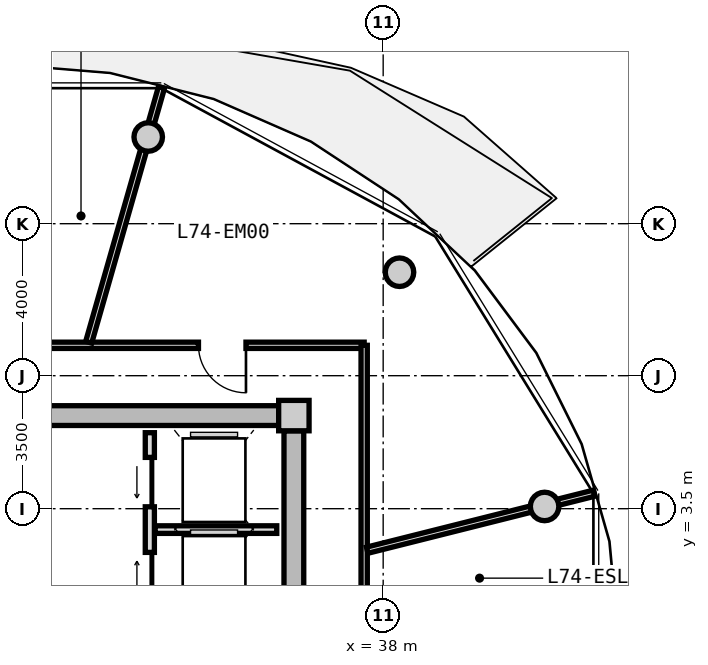
"""IFC4 building model, lengths in metres.
Left out: names, types, materials, properties, quantities, classifications, styles, units other than length and angle.
Written with IfcOpenShell. Run it as: python <this file> out.ifc"""

import sys

from ifc_helpers import new_model, si_unit, direction, frame, frame_2d, origin, origin_2d, place, context, subcontext, project, spatial, rectangle, circle, extrude, source, transform, mapped, element, fill, save


model = new_model("IFC4")
c1 = context("Model", 3, precision=1e-05, world=origin(), true_north=direction((0.0, 1.0)))
c2 = subcontext(c1, "Body", "Model", "MODEL_VIEW")
j1 = project(units=[si_unit("LENGTHUNIT", "METRE"), si_unit("PLANEANGLEUNIT", "RADIAN")], contexts=[c1])
p1 = place(None, origin())
s1 = spatial("IfcSite", under=j1, at=p1, CompositionType="ELEMENT")
p2 = place(p1, origin())
s2 = spatial("IfcBuilding", under=s1, at=p2, CompositionType="ELEMENT")
p3 = place(p2, frame((0.0, 0.0, 238.3)))
s3 = spatial("IfcBuildingStorey", under=s2, at=p3, CompositionType="ELEMENT", Elevation=238.3)
m1 = source(origin(), c2, "Body", "SweptSolid", [
    extrude(rectangle(XDim=0.8, YDim=0.8, at=origin_2d()), origin(), (0.0, 0.0, 1.0), 3.05),
])
p4 = place(p3, frame((35.65, 5.95, 0.0), z_axis=(0.0, 0.0, 1.0), x_axis=(1.0, 0.0, 0.0)))
e1 = element("IfcColumn", 1, at=p4, inside=s3, PredefinedType="COLUMN", context=c2, shape_type="MappedRepresentation", body=[
    mapped(m1, transform((0.0, 0.0, 0.0), x_axis=(1.0, 0.0, 0.0), y_axis=(0.0, 1.0, 0.0), z_axis=(0.0, 0.0, 1.0), scale=1.0)),
])
m2 = source(origin(), c2, "Body", "SweptSolid", [
    extrude(rectangle(XDim=14.5, YDim=0.52, at=frame_2d((7.25, 0.0))), origin(), (0.0, 0.0, 1.0), 2.81),
])
p5 = place(p3, frame((20.75, 5.95, 0.0), z_axis=(0.0, 0.0, 1.0), x_axis=(1.0, 0.0, 0.0)))
e2 = element("IfcWall", 2, at=p5, inside=s3, PredefinedType="SHEAR", context=c2, shape_type="MappedRepresentation", body=[
    mapped(m2, transform((0.0, 0.0, 0.0), x_axis=(1.0, 0.0, 0.0), y_axis=(0.0, 1.0, 0.0), z_axis=(0.0, 0.0, 1.0), scale=1.0)),
])
m3 = source(origin(), c2, "Body", "SweptSolid", [
    extrude(rectangle(XDim=11.1, YDim=0.52, at=frame_2d((5.55, 0.0))), origin(), (0.0, 0.0, 1.0), 2.81),
])
p6 = place(p3, frame((35.65, 5.55, 0.0), z_axis=(0.0, 0.0, 1.0), x_axis=(0.0, -1.0, 0.0)))
e3 = element("IfcWall", 3, at=p6, inside=s3, PredefinedType="SHEAR", context=c2, shape_type="MappedRepresentation", body=[
    mapped(m3, transform((0.0, 0.0, 0.0), x_axis=(1.0, 0.0, 0.0), y_axis=(0.0, 1.0, 0.0), z_axis=(0.0, 0.0, 1.0), scale=1.0)),
])
p7 = place(p6, frame((5.65, 0.0, 0.0)))
e4 = element("IfcOpeningElement", 4, at=p7, cuts=e3, PredefinedType="OPENING", context=c2, shape_type="SweptSolid", body=[
    extrude(rectangle(XDim=1.2, YDim=2.15, at=frame_2d((0.6, 1.075))), frame((0.0, 0.27, 0.0), z_axis=(0.0, -1.0, 0.0), x_axis=(1.0, 0.0, 0.0)), (0.0, 0.0, 1.0), 0.54),
])
m4 = source(origin(), c2, "Body", "SweptSolid", [
    extrude(circle(Radius=0.375, at=origin_2d()), origin(), (0.0, 0.0, 1.0), 3.05),
])
for number, where, z_axis, x_axis in (
    (5, (42.247, 3.559, 0.0), (0.0, 0.0, 1.0), (1.0, 0.0, 0.0)),
    (6, (38.43, 9.723, 0.0), (0.0, 0.0, 1.0), (1.0, 0.0, 0.0)),
    (7, (31.818, 13.281, 0.0), (0.0, 0.0, 1.0), (1.0, 0.0, 0.0)),
):
    element("IfcColumn", number, at=place(p3, frame(where, z_axis=z_axis, x_axis=x_axis)), inside=s3, PredefinedType="COLUMN", context=c2, shape_type="MappedRepresentation", body=[
        mapped(m4, transform((0.0, 0.0, 0.0), x_axis=(1.0, 0.0, 0.0), y_axis=(0.0, 1.0, 0.0), z_axis=(0.0, 0.0, 1.0), scale=1.0)),
    ])
m5 = source(origin(), c2, "Body", "SweptSolid", [
    extrude(rectangle(XDim=5.0, YDim=0.24, at=frame_2d((2.5, 0.0))), origin(), (0.0, 0.0, 1.0), 2.795),
])
p8 = place(p3, frame((31.86, 0.5, 0.0), z_axis=(0.0, 0.0, 1.0), x_axis=(0.0, 1.0, 0.0)))
e8 = element("IfcWall", 8, at=p8, inside=s3, PredefinedType="PARTITIONING", context=c2, shape_type="MappedRepresentation", body=[
    mapped(m5, transform((0.0, 0.0, 0.0), x_axis=(1.0, 0.0, 0.0), y_axis=(0.0, 1.0, 0.0), z_axis=(0.0, 0.0, 1.0), scale=1.0)),
])
p9 = place(p8, frame((3.05, 0.0, 0.0)))
e9 = element("IfcOpeningElement", 9, at=p9, cuts=e8, PredefinedType="OPENING", context=c2, shape_type="SweptSolid", body=[
    extrude(rectangle(XDim=1.3, YDim=2.2, at=frame_2d((0.65, 1.1))), frame((0.0, 0.13, 0.0), z_axis=(0.0, -1.0, 0.0), x_axis=(1.0, 0.0, 0.0)), (0.0, 0.0, 1.0), 0.26),
])
p10 = place(p8, frame((0.55, 0.0, 0.0)))
e10 = element("IfcOpeningElement", 10, at=p10, cuts=e8, PredefinedType="OPENING", context=c2, shape_type="SweptSolid", body=[
    extrude(rectangle(XDim=1.3, YDim=2.2, at=frame_2d((0.65, 1.1))), frame((0.0, 0.13, 0.0), z_axis=(0.0, -1.0, 0.0), x_axis=(1.0, 0.0, 0.0)), (0.0, 0.0, 1.0), 0.26),
])
m6 = source(origin(), c2, "Body", "SweptSolid", [
    extrude(rectangle(XDim=3.2, YDim=0.2, at=frame_2d((1.6, 0.0))), origin(), (0.0, 0.0, 1.0), 2.795),
])
p11 = place(p3, frame((32.0, 2.95, 0.0), z_axis=(0.0, 0.0, 1.0), x_axis=(1.0, 0.0, 0.0)))
e11 = element("IfcWall", 11, at=p11, inside=s3, PredefinedType="PARTITIONING", context=c2, shape_type="MappedRepresentation", body=[
    mapped(m6, transform((0.0, 0.0, 0.0), x_axis=(1.0, 0.0, 0.0), y_axis=(0.0, 1.0, 0.0), z_axis=(0.0, 0.0, 1.0), scale=1.0)),
])
m7 = source(origin(), c2, "Body", "SweptSolid", [
    extrude(rectangle(XDim=8.58, YDim=0.165, at=frame_2d((4.29, 0.0))), origin(), (0.0, 0.0, 1.0), 2.795),
])
p12 = place(p3, frame((28.92, 7.8, 0.0), z_axis=(0.0, 0.0, 1.0), x_axis=(1.0, 0.0, 0.0)))
e12 = element("IfcWall", 12, at=p12, inside=s3, PredefinedType="PARTITIONING", context=c2, shape_type="MappedRepresentation", body=[
    mapped(m7, transform((0.0, 0.0, 0.0), x_axis=(1.0, 0.0, 0.0), y_axis=(0.0, 1.0, 0.0), z_axis=(0.0, 0.0, 1.0), scale=1.0)),
])
p13 = place(p12, frame((4.22, 0.0, 0.0)))
e13 = element("IfcOpeningElement", 13, at=p13, cuts=e12, PredefinedType="OPENING", context=c2, shape_type="SweptSolid", body=[
    extrude(rectangle(XDim=1.25, YDim=2.2, at=frame_2d((0.625, 1.1))), frame((0.0, 0.093, 0.0), z_axis=(0.0, -1.0, 0.0), x_axis=(1.0, 0.0, 0.0)), (0.0, 0.0, 1.0), 0.185),
])
m8 = source(origin(), c2, "Body", "SweptSolid", [
    extrude(rectangle(XDim=6.88, YDim=0.165, at=frame_2d((3.44, 0.0))), origin(), (0.0, 0.0, 1.0), 2.795),
])
p14 = place(p3, frame((37.5, 7.8, 0.0), z_axis=(0.0, 0.0, 1.0), x_axis=(0.0, -1.0, 0.0)))
e14 = element("IfcWall", 14, at=p14, inside=s3, PredefinedType="PARTITIONING", context=c2, shape_type="MappedRepresentation", body=[
    mapped(m8, transform((0.0, 0.0, 0.0), x_axis=(1.0, 0.0, 0.0), y_axis=(0.0, 1.0, 0.0), z_axis=(0.0, 0.0, 1.0), scale=1.0)),
])
m9 = source(origin(), c2, "Body", "SweptSolid", [
    extrude(rectangle(XDim=6.974, YDim=0.165, at=frame_2d((3.487, 0.0))), origin(), (0.0, 0.0, 1.0), 2.395),
])
p15 = place(p3, frame((30.251, 7.88, 0.0), z_axis=(0.0, 0.0, 1.0), x_axis=(0.274707256801, 0.961527910703, 0.0)))
e15 = element("IfcWall", 15, at=p15, inside=s3, PredefinedType="PARTITIONING", context=c2, shape_type="MappedRepresentation", body=[
    mapped(m9, transform((0.0, 0.0, 0.0), x_axis=(1.0, 0.0, 0.0), y_axis=(0.0, 1.0, 0.0), z_axis=(0.0, 0.0, 1.0), scale=1.0)),
])
m10 = source(origin(), c2, "Body", "SweptSolid", [
    extrude(rectangle(XDim=6.157, YDim=0.165, at=frame_2d((3.079, 0.0))), origin(), (0.0, 0.0, 1.0), 2.395),
])
p16 = place(p3, frame((37.58, 2.407, 0.0), z_axis=(0.0, 0.0, 1.0), x_axis=(0.969840867184, 0.243738984038, 0.0)))
e16 = element("IfcWall", 16, at=p16, inside=s3, PredefinedType="PARTITIONING", context=c2, shape_type="MappedRepresentation", body=[
    mapped(m10, transform((0.0, 0.0, 0.0), x_axis=(1.0, 0.0, 0.0), y_axis=(0.0, 1.0, 0.0), z_axis=(0.0, 0.0, 1.0), scale=1.0)),
])
m11 = source(origin(), c2, "Body", "SweptSolid", [
    extrude(rectangle(XDim=1.3, YDim=2.2, at=frame_2d((0.65, 1.1))), frame((0.0, 0.025, 0.0), z_axis=(0.0, -1.0, 0.0), x_axis=(1.0, 0.0, 0.0)), (0.0, 0.0, 1.0), 0.05),
])
p17 = place(p9, origin())
e17 = element("IfcDoor", 17, at=p17, inside=s3, OperationType="SLIDING_TO_LEFT", PredefinedType="DOOR", context=c2, shape_type="MappedRepresentation", body=[
    mapped(m11, transform((0.0, 0.0, 0.0), x_axis=(1.0, 0.0, 0.0), y_axis=(0.0, 1.0, 0.0), z_axis=(0.0, 0.0, 1.0), scale=1.0)),
])
fill(e9, e17)
p18 = place(p10, origin())
e18 = element("IfcDoor", 18, at=p18, inside=s3, OperationType="SLIDING_TO_RIGHT", PredefinedType="DOOR", context=c2, shape_type="MappedRepresentation", body=[
    mapped(m11, transform((0.0, 0.0, 0.0), x_axis=(1.0, 0.0, 0.0), y_axis=(0.0, 1.0, 0.0), z_axis=(0.0, 0.0, 1.0), scale=1.0)),
])
fill(e10, e18)
m12 = source(origin(), c2, "Body", "SweptSolid", [
    extrude(rectangle(XDim=1.25, YDim=2.2, at=frame_2d((0.625, 1.1))), frame((0.0, 0.025, 0.0), z_axis=(0.0, -1.0, 0.0), x_axis=(1.0, 0.0, 0.0)), (0.0, 0.0, 1.0), 0.05),
])
p19 = place(p13, frame((1.25, 0.0, 0.0), z_axis=(0.0, 0.0, 1.0), x_axis=(-1.0, 0.0, 0.0)))
e19 = element("IfcDoor", 19, at=p19, inside=s3, OperationType="SINGLE_SWING_LEFT", PredefinedType="DOOR", context=c2, shape_type="MappedRepresentation", body=[
    mapped(m12, transform((0.0, 0.0, 0.0), x_axis=(1.0, 0.0, 0.0), y_axis=(0.0, 1.0, 0.0), z_axis=(0.0, 0.0, 1.0), scale=1.0)),
])
fill(e13, e19)
save(model, sys.argv[1])
